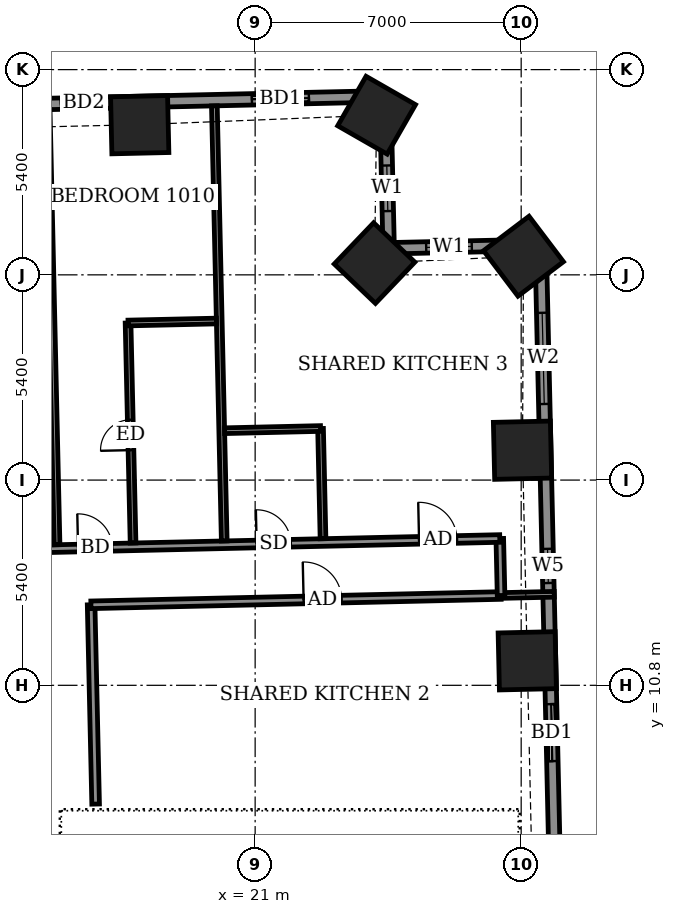
"""IFC4 building model, lengths in metres.
Left out: names, types, materials, properties, quantities, classifications, styles, units other than length and angle.
Written with IfcOpenShell. Run it as: python <this file> out.ifc"""

import sys

from ifc_helpers import new_model, si_unit, direction, frame, frame_2d, origin, origin_2d, place, context, subcontext, project, spatial, rectangle, extrude, element, fill, save


model = new_model("IFC4")
c1 = context("Model", 3, precision=1e-05, world=origin(), true_north=direction((0.0, 1.0)))
c2 = subcontext(c1, "Body", "Model", "MODEL_VIEW")
j1 = project(units=[si_unit("LENGTHUNIT", "METRE"), si_unit("PLANEANGLEUNIT", "RADIAN")], contexts=[c1])
p1 = place(None, origin())
s1 = spatial("IfcSite", under=j1, at=p1, CompositionType="ELEMENT")
p2 = place(p1, origin())
s2 = spatial("IfcBuilding", under=s1, at=p2, CompositionType="ELEMENT")
p3 = place(p2, frame((0.0, 0.0, 44.9)))
s3 = spatial("IfcBuildingStorey", under=s2, at=p3, CompositionType="ELEMENT", Elevation=44.9)
for number, where, z_axis, x_axis in (
    (1, (28.16, 11.445, -0.55), (0.0, 0.0, 1.0), (-0.023, 1.0, 0.0)),
    (2, (28.035, 16.986, -0.55), (0.0, 0.0, 1.0), (-0.023, 1.0, 0.0)),
    (3, (28.061, 22.09, -0.55), (0.0, 0.0, 1.0), (-0.604, 0.797, 0.0)),
    (4, (24.142, 21.91, -0.55), (0.0, 0.0, 1.0), (-0.723, 0.691, 0.0)),
    (5, (24.196, 25.8, -0.55), (0.0, 0.0, 1.0), (-0.868, 0.497, 0.0)),
    (6, (17.963, 25.551, -0.55), (0.0, 0.0, 1.0), (-1.0, -0.023, 0.0)),
):
    element("IfcColumn", number, at=place(p3, frame(where, z_axis=z_axis, x_axis=x_axis)), inside=s3, PredefinedType="COLUMN", context=c2, shape_type="SweptSolid", body=[
        extrude(rectangle(XDim=1.5, YDim=1.5, at=origin_2d()), origin(), (0.0, 0.0, 1.0), 3.6),
    ])
p4 = place(p3, frame((28.887, 5.864, 0.0), z_axis=(0.0, 0.0, 1.0), x_axis=(-0.022687182773, 0.999742612745, 0.0)))
e7 = element("IfcWall", 7, at=p4, inside=s3, PredefinedType="SOLIDWALL", context=c2, shape_type="SweptSolid", body=[
    extrude(rectangle(XDim=16.529, YDim=0.3, at=frame_2d((8.265, 0.0))), origin(), (0.0, 0.0, 1.0), 3.05),
])
p5 = place(p4, frame((2.942, 0.0, 0.0)))
e8 = element("IfcOpeningElement", 8, at=p5, cuts=e7, PredefinedType="OPENING", context=c2, shape_type="SweptSolid", body=[
    extrude(rectangle(XDim=1.5, YDim=2.4, at=frame_2d((0.75, 1.2))), frame((0.0, 0.16, 0.0), z_axis=(0.0, -1.0, 0.0), x_axis=(1.0, 0.0, 0.0)), (0.0, 0.0, 1.0), 0.32),
])
p6 = place(p4, frame((7.629, 0.0, 0.9)))
e9 = element("IfcOpeningElement", 9, at=p6, cuts=e7, PredefinedType="OPENING", context=c2, shape_type="SweptSolid", body=[
    extrude(rectangle(XDim=0.9, YDim=1.5, at=frame_2d((0.45, 0.75))), frame((0.0, 0.16, 0.0), z_axis=(0.0, -1.0, 0.0), x_axis=(1.0, 0.0, 0.0)), (0.0, 0.0, 1.0), 0.32),
])
p7 = place(p4, frame((12.341, 0.0, 0.9)))
e10 = element("IfcOpeningElement", 10, at=p7, cuts=e7, PredefinedType="OPENING", context=c2, shape_type="SweptSolid", body=[
    extrude(rectangle(XDim=2.4, YDim=1.5, at=frame_2d((1.2, 0.75))), frame((0.0, 0.16, 0.0), z_axis=(0.0, -1.0, 0.0), x_axis=(1.0, 0.0, 0.0)), (0.0, 0.0, 1.0), 0.32),
])
p8 = place(p3, frame((28.512, 22.389, 0.0), z_axis=(0.0, 0.0, 1.0), x_axis=(-0.999747725427, -0.022460754759, 0.0)))
e11 = element("IfcWall", 11, at=p8, inside=s3, PredefinedType="SOLIDWALL", context=c2, shape_type="SweptSolid", body=[
    extrude(rectangle(XDim=4.0, YDim=0.3, at=frame_2d((2.0, 0.0))), origin(), (0.0, 0.0, 1.0), 2.55),
])
p9 = place(p8, frame((1.812, 0.0, 0.9)))
e12 = element("IfcOpeningElement", 12, at=p9, cuts=e11, PredefinedType="OPENING", context=c2, shape_type="SweptSolid", body=[
    extrude(rectangle(XDim=1.2, YDim=1.5, at=frame_2d((0.6, 0.75))), frame((0.0, 0.16, 0.0), z_axis=(0.0, -1.0, 0.0), x_axis=(1.0, 0.0, 0.0)), (0.0, 0.0, 1.0), 0.32),
])
p10 = place(p3, frame((24.513, 22.299, 0.0), z_axis=(0.0, 0.0, 1.0), x_axis=(-0.022460754759, 0.999747725427, 0.0)))
e13 = element("IfcWall", 13, at=p10, inside=s3, PredefinedType="SOLIDWALL", context=c2, shape_type="SweptSolid", body=[
    extrude(rectangle(XDim=4.0, YDim=0.3, at=frame_2d((2.0, 0.0))), origin(), (0.0, 0.0, 1.0), 2.55),
])
p11 = place(p10, frame((0.979, 0.0, 0.9)))
e14 = element("IfcOpeningElement", 14, at=p11, cuts=e13, PredefinedType="OPENING", context=c2, shape_type="SweptSolid", body=[
    extrude(rectangle(XDim=1.2, YDim=1.5, at=frame_2d((0.6, 0.75))), frame((0.0, 0.16, 0.0), z_axis=(0.0, -1.0, 0.0), x_axis=(1.0, 0.0, 0.0)), (0.0, 0.0, 1.0), 0.32),
])
p12 = place(p3, frame((24.423, 26.298, 0.0), z_axis=(0.0, 0.0, 1.0), x_axis=(-0.999742433108, -0.022695097355, 0.0)))
e15 = element("IfcWall", 15, at=p12, inside=s3, PredefinedType="SOLIDWALL", context=c2, shape_type="SweptSolid", body=[
    extrude(rectangle(XDim=52.701, YDim=0.3, at=frame_2d((26.35, 0.0))), origin(), (0.0, 0.0, 1.0), 3.05),
])
p13 = place(p12, frame((2.009, 0.0, 0.0)))
e16 = element("IfcOpeningElement", 16, at=p13, cuts=e15, PredefinedType="OPENING", context=c2, shape_type="SweptSolid", body=[
    extrude(rectangle(XDim=1.5, YDim=2.4, at=frame_2d((0.75, 1.2))), frame((0.0, 0.16, 0.0), z_axis=(0.0, -1.0, 0.0), x_axis=(1.0, 0.0, 0.0)), (0.0, 0.0, 1.0), 0.32),
])
p14 = place(p12, frame((7.337, 0.0, 0.0)))
e17 = element("IfcOpeningElement", 17, at=p14, cuts=e15, PredefinedType="OPENING", context=c2, shape_type="SweptSolid", body=[
    extrude(rectangle(XDim=1.2, YDim=2.4, at=frame_2d((0.6, 1.2))), frame((0.0, 0.16, 0.0), z_axis=(0.0, -1.0, 0.0), x_axis=(1.0, 0.0, 0.0)), (0.0, 0.0, 1.0), 0.32),
])
p15 = place(p12, frame((10.0, 0.0, 0.0)))
e18 = element("IfcOpeningElement", 18, at=p15, cuts=e15, PredefinedType="OPENING", context=c2, shape_type="SweptSolid", body=[
    extrude(rectangle(XDim=1.5, YDim=2.4, at=frame_2d((0.75, 1.2))), frame((0.0, 0.16, 0.0), z_axis=(0.0, -1.0, 0.0), x_axis=(1.0, 0.0, 0.0)), (0.0, 0.0, 1.0), 0.32),
])
p16 = place(p12, frame((14.85, 0.0, 0.0)))
e19 = element("IfcOpeningElement", 19, at=p16, cuts=e15, PredefinedType="OPENING", context=c2, shape_type="SweptSolid", body=[
    extrude(rectangle(XDim=1.5, YDim=2.4, at=frame_2d((0.75, 1.2))), frame((0.0, 0.16, 0.0), z_axis=(0.0, -1.0, 0.0), x_axis=(1.0, 0.0, 0.0)), (0.0, 0.0, 1.0), 0.32),
])
p17 = place(p12, frame((20.638, 0.0, 0.9)))
e20 = element("IfcOpeningElement", 20, at=p17, cuts=e15, PredefinedType="OPENING", context=c2, shape_type="SweptSolid", body=[
    extrude(rectangle(XDim=0.9, YDim=1.5, at=frame_2d((0.45, 0.75))), frame((0.0, 0.16, 0.0), z_axis=(0.0, -1.0, 0.0), x_axis=(1.0, 0.0, 0.0)), (0.0, 0.0, 1.0), 0.32),
])
p18 = place(p12, frame((23.125, 0.0, 0.0)))
e21 = element("IfcOpeningElement", 21, at=p18, cuts=e15, PredefinedType="OPENING", context=c2, shape_type="SweptSolid", body=[
    extrude(rectangle(XDim=1.5, YDim=2.4, at=frame_2d((0.75, 1.2))), frame((0.0, 0.16, 0.0), z_axis=(0.0, -1.0, 0.0), x_axis=(1.0, 0.0, 0.0)), (0.0, 0.0, 1.0), 0.32),
])
p19 = place(p12, frame((27.9, 0.0, 0.0)))
e22 = element("IfcOpeningElement", 22, at=p19, cuts=e15, PredefinedType="OPENING", context=c2, shape_type="SweptSolid", body=[
    extrude(rectangle(XDim=1.5, YDim=2.4, at=frame_2d((0.75, 1.2))), frame((0.0, 0.16, 0.0), z_axis=(0.0, -1.0, 0.0), x_axis=(1.0, 0.0, 0.0)), (0.0, 0.0, 1.0), 0.32),
])
p20 = place(p12, frame((30.862, 0.0, 0.0)))
e23 = element("IfcOpeningElement", 23, at=p20, cuts=e15, PredefinedType="OPENING", context=c2, shape_type="SweptSolid", body=[
    extrude(rectangle(XDim=1.2, YDim=2.4, at=frame_2d((0.6, 1.2))), frame((0.0, 0.16, 0.0), z_axis=(0.0, -1.0, 0.0), x_axis=(1.0, 0.0, 0.0)), (0.0, 0.0, 1.0), 0.32),
])
p21 = place(p12, frame((36.1, 0.0, 0.0)))
e24 = element("IfcOpeningElement", 24, at=p21, cuts=e15, PredefinedType="OPENING", context=c2, shape_type="SweptSolid", body=[
    extrude(rectangle(XDim=1.5, YDim=2.4, at=frame_2d((0.75, 1.2))), frame((0.0, 0.16, 0.0), z_axis=(0.0, -1.0, 0.0), x_axis=(1.0, 0.0, 0.0)), (0.0, 0.0, 1.0), 0.32),
])
p22 = place(p12, frame((40.975, 0.0, 0.0)))
e25 = element("IfcOpeningElement", 25, at=p22, cuts=e15, PredefinedType="OPENING", context=c2, shape_type="SweptSolid", body=[
    extrude(rectangle(XDim=1.5, YDim=2.4, at=frame_2d((0.75, 1.2))), frame((0.0, 0.16, 0.0), z_axis=(0.0, -1.0, 0.0), x_axis=(1.0, 0.0, 0.0)), (0.0, 0.0, 1.0), 0.32),
])
p23 = place(p12, frame((43.788, 0.0, 0.0)))
e26 = element("IfcOpeningElement", 26, at=p23, cuts=e15, PredefinedType="OPENING", context=c2, shape_type="SweptSolid", body=[
    extrude(rectangle(XDim=1.5, YDim=2.4, at=frame_2d((0.75, 1.2))), frame((0.0, 0.16, 0.0), z_axis=(0.0, -1.0, 0.0), x_axis=(1.0, 0.0, 0.0)), (0.0, 0.0, 1.0), 0.32),
])
p24 = place(p12, frame((48.464, 0.0, 0.9)))
e27 = element("IfcOpeningElement", 27, at=p24, cuts=e15, PredefinedType="OPENING", context=c2, shape_type="SweptSolid", body=[
    extrude(rectangle(XDim=2.4, YDim=1.5, at=frame_2d((1.2, 0.75))), frame((0.0, 0.16, 0.0), z_axis=(0.0, -1.0, 0.0), x_axis=(1.0, 0.0, 0.0)), (0.0, 0.0, 1.0), 0.32),
])
p25 = place(p3, frame((30.037, 19.073, 0.0), z_axis=(0.0, 0.0, 1.0), x_axis=(-0.022600979566, 0.999744565238, 0.0)))
e28 = element("IfcWall", 28, at=p25, inside=s3, PredefinedType="USERDEFINED", context=c2, shape_type="SweptSolid", body=[
    extrude(rectangle(XDim=3.5, YDim=0.55, at=frame_2d((1.75, 0.0))), origin(), (0.0, 0.0, 1.0), 0.8),
])
p26 = place(p3, frame((16.803, 7.675, 0.0), z_axis=(0.0, 0.0, 1.0), x_axis=(-0.022667483124, 0.999743059595, 0.0)))
e29 = element("IfcWall", 29, at=p26, inside=s3, PredefinedType="PARTITIONING", context=c2, shape_type="SweptSolid", body=[
    extrude(rectangle(XDim=5.245, YDim=0.2, at=frame_2d((2.623, 0.0))), origin(), (0.0, 0.0, 1.0), 3.05),
])
p27 = place(p3, frame((16.679, 12.918, 0.0), z_axis=(0.0, 0.0, 1.0), x_axis=(0.999742162372, 0.022707020428, 0.0)))
e30 = element("IfcWall", 30, at=p27, inside=s3, PredefinedType="PARTITIONING", context=c2, shape_type="SweptSolid", body=[
    extrude(rectangle(XDim=10.795, YDim=0.2, at=frame_2d((5.397, 0.0))), origin(), (0.0, 0.0, 1.0), 3.05),
])
p28 = place(p27, frame((5.598, 0.0, 0.0)))
e31 = element("IfcOpeningElement", 31, at=p28, cuts=e30, PredefinedType="OPENING", context=c2, shape_type="SweptSolid", body=[
    extrude(rectangle(XDim=1.0, YDim=2.1, at=frame_2d((0.5, 1.05))), frame((0.0, 0.11, 0.0), z_axis=(0.0, -1.0, 0.0), x_axis=(1.0, 0.0, 0.0)), (0.0, 0.0, 1.0), 0.22),
])
p29 = place(p3, frame((27.471, 13.163, 0.0), z_axis=(0.0, 0.0, 1.0), x_axis=(0.999739219063, 0.022836240226, 0.0)))
e32 = element("IfcWall", 32, at=p29, inside=s3, PredefinedType="PARTITIONING", context=c2, shape_type="SweptSolid", body=[
    extrude(rectangle(XDim=1.4, YDim=0.15, at=frame_2d((0.7, 0.0))), origin(), (0.0, 0.0, 1.0), 2.55),
])
p30 = place(p3, frame((27.471, 13.163, 0.0), z_axis=(0.0, 0.0, 1.0), x_axis=(-0.022617910375, 0.999744182344, 0.0)))
e33 = element("IfcWall", 33, at=p30, inside=s3, PredefinedType="PARTITIONING", context=c2, shape_type="SweptSolid", body=[
    extrude(rectangle(XDim=1.5, YDim=0.2, at=frame_2d((0.75, 0.0))), origin(), (0.0, 0.0, 1.0), 3.05),
])
p31 = place(p3, frame((-31.347, 13.329, 0.0), z_axis=(0.0, 0.0, 1.0), x_axis=(0.999742613079, 0.022687168058, 0.0)))
e34 = element("IfcWall", 34, at=p31, inside=s3, PredefinedType="PARTITIONING", context=c2, shape_type="SweptSolid", body=[
    extrude(rectangle(XDim=58.799, YDim=0.2, at=frame_2d((29.399, 0.0))), origin(), (0.0, 0.0, 1.0), 3.05),
])
p32 = place(p31, frame((56.675, 0.0, 0.0)))
e35 = element("IfcOpeningElement", 35, at=p32, cuts=e34, PredefinedType="OPENING", context=c2, shape_type="SweptSolid", body=[
    extrude(rectangle(XDim=1.0, YDim=2.1, at=frame_2d((0.5, 1.05))), frame((0.0, 0.11, 0.0), z_axis=(0.0, -1.0, 0.0), x_axis=(1.0, 0.0, 0.0)), (0.0, 0.0, 1.0), 0.22),
])
p33 = place(p31, frame((52.4, 0.0, 0.0)))
e36 = element("IfcOpeningElement", 36, at=p33, cuts=e34, PredefinedType="OPENING", context=c2, shape_type="SweptSolid", body=[
    extrude(rectangle(XDim=0.9, YDim=2.1, at=frame_2d((0.45, 1.05))), frame((0.0, 0.11, 0.0), z_axis=(0.0, -1.0, 0.0), x_axis=(1.0, 0.0, 0.0)), (0.0, 0.0, 1.0), 0.22),
])
p34 = place(p31, frame((47.7, 0.0, 0.0)))
e37 = element("IfcOpeningElement", 37, at=p34, cuts=e34, PredefinedType="OPENING", context=c2, shape_type="SweptSolid", body=[
    extrude(rectangle(XDim=0.9, YDim=2.1, at=frame_2d((0.45, 1.05))), frame((0.0, 0.11, 0.0), z_axis=(0.0, -1.0, 0.0), x_axis=(1.0, 0.0, 0.0)), (0.0, 0.0, 1.0), 0.22),
])
p35 = place(p31, frame((45.7, 0.0, 0.0)))
e38 = element("IfcOpeningElement", 38, at=p35, cuts=e34, PredefinedType="OPENING", context=c2, shape_type="SweptSolid", body=[
    extrude(rectangle(XDim=0.9, YDim=2.1, at=frame_2d((0.45, 1.05))), frame((0.0, 0.11, 0.0), z_axis=(0.0, -1.0, 0.0), x_axis=(1.0, 0.0, 0.0)), (0.0, 0.0, 1.0), 0.22),
])
p36 = place(p31, frame((38.95, 0.0, 0.0)))
e39 = element("IfcOpeningElement", 39, at=p36, cuts=e34, PredefinedType="OPENING", context=c2, shape_type="SweptSolid", body=[
    extrude(rectangle(XDim=0.9, YDim=2.1, at=frame_2d((0.45, 1.05))), frame((0.0, 0.11, 0.0), z_axis=(0.0, -1.0, 0.0), x_axis=(1.0, 0.0, 0.0)), (0.0, 0.0, 1.0), 0.22),
])
p37 = place(p31, frame((37.05, 0.0, 0.0)))
e40 = element("IfcOpeningElement", 40, at=p37, cuts=e34, PredefinedType="OPENING", context=c2, shape_type="SweptSolid", body=[
    extrude(rectangle(XDim=0.9, YDim=2.1, at=frame_2d((0.45, 1.05))), frame((0.0, 0.11, 0.0), z_axis=(0.0, -1.0, 0.0), x_axis=(1.0, 0.0, 0.0)), (0.0, 0.0, 1.0), 0.22),
])
p38 = place(p31, frame((30.375, 0.0, 0.0)))
e41 = element("IfcOpeningElement", 41, at=p38, cuts=e34, PredefinedType="OPENING", context=c2, shape_type="SweptSolid", body=[
    extrude(rectangle(XDim=0.9, YDim=2.1, at=frame_2d((0.45, 1.05))), frame((0.0, 0.11, 0.0), z_axis=(0.0, -1.0, 0.0), x_axis=(1.0, 0.0, 0.0)), (0.0, 0.0, 1.0), 0.22),
])
p39 = place(p31, frame((28.5, 0.0, 0.0)))
e42 = element("IfcOpeningElement", 42, at=p39, cuts=e34, PredefinedType="OPENING", context=c2, shape_type="SweptSolid", body=[
    extrude(rectangle(XDim=0.9, YDim=2.1, at=frame_2d((0.45, 1.05))), frame((0.0, 0.11, 0.0), z_axis=(0.0, -1.0, 0.0), x_axis=(1.0, 0.0, 0.0)), (0.0, 0.0, 1.0), 0.22),
])
p40 = place(p31, frame((21.825, 0.0, 0.0)))
e43 = element("IfcOpeningElement", 43, at=p40, cuts=e34, PredefinedType="OPENING", context=c2, shape_type="SweptSolid", body=[
    extrude(rectangle(XDim=0.9, YDim=2.1, at=frame_2d((0.45, 1.05))), frame((0.0, 0.11, 0.0), z_axis=(0.0, -1.0, 0.0), x_axis=(1.0, 0.0, 0.0)), (0.0, 0.0, 1.0), 0.22),
])
p41 = place(p31, frame((19.95, 0.0, 0.0)))
e44 = element("IfcOpeningElement", 44, at=p41, cuts=e34, PredefinedType="OPENING", context=c2, shape_type="SweptSolid", body=[
    extrude(rectangle(XDim=0.9, YDim=2.1, at=frame_2d((0.45, 1.05))), frame((0.0, 0.11, 0.0), z_axis=(0.0, -1.0, 0.0), x_axis=(1.0, 0.0, 0.0)), (0.0, 0.0, 1.0), 0.22),
])
p42 = place(p31, frame((13.225, 0.0, 0.0)))
e45 = element("IfcOpeningElement", 45, at=p42, cuts=e34, PredefinedType="OPENING", context=c2, shape_type="SweptSolid", body=[
    extrude(rectangle(XDim=0.9, YDim=2.1, at=frame_2d((0.45, 1.05))), frame((0.0, 0.11, 0.0), z_axis=(0.0, -1.0, 0.0), x_axis=(1.0, 0.0, 0.0)), (0.0, 0.0, 1.0), 0.22),
])
p43 = place(p31, frame((11.25, 0.0, 0.0)))
e46 = element("IfcOpeningElement", 46, at=p43, cuts=e34, PredefinedType="OPENING", context=c2, shape_type="SweptSolid", body=[
    extrude(rectangle(XDim=0.9, YDim=2.1, at=frame_2d((0.45, 1.05))), frame((0.0, 0.11, 0.0), z_axis=(0.0, -1.0, 0.0), x_axis=(1.0, 0.0, 0.0)), (0.0, 0.0, 1.0), 0.22),
])
p44 = place(p31, frame((1.75, 0.0, 0.0)))
e47 = element("IfcOpeningElement", 47, at=p44, cuts=e34, PredefinedType="OPENING", context=c2, shape_type="SweptSolid", body=[
    extrude(rectangle(XDim=1.0, YDim=2.1, at=frame_2d((0.5, 1.05))), frame((0.0, 0.11, 0.0), z_axis=(0.0, -1.0, 0.0), x_axis=(1.0, 0.0, 0.0)), (0.0, 0.0, 1.0), 0.22),
])
p45 = place(p31, frame((6.65, 0.0, 0.0)))
e48 = element("IfcOpeningElement", 48, at=p45, cuts=e34, PredefinedType="OPENING", context=c2, shape_type="SweptSolid", body=[
    extrude(rectangle(XDim=0.9, YDim=2.1, at=frame_2d((0.45, 1.05))), frame((0.0, 0.11, 0.0), z_axis=(0.0, -1.0, 0.0), x_axis=(1.0, 0.0, 0.0)), (0.0, 0.0, 1.0), 0.22),
])
p46 = place(p3, frame((15.788, 14.499, 0.0), z_axis=(0.0, 0.0, 1.0), x_axis=(-0.022708327922, 0.999742132674, 0.0)))
e49 = element("IfcWall", 49, at=p46, inside=s3, PredefinedType="PARTITIONING", context=c2, shape_type="SweptSolid", body=[
    extrude(rectangle(XDim=11.45, YDim=0.15, at=frame_2d((5.725, 0.0))), origin(), (0.0, 0.0, 1.0), 2.55),
])
p47 = place(p3, frame((17.788, 14.544, 0.0), z_axis=(0.0, 0.0, 1.0), x_axis=(-0.022809516176, 0.999739829141, 0.0)))
e50 = element("IfcWall", 50, at=p47, inside=s3, PredefinedType="PARTITIONING", context=c2, shape_type="SweptSolid", body=[
    extrude(rectangle(XDim=5.791, YDim=0.15, at=frame_2d((2.895, 0.0))), origin(), (0.0, 0.0, 1.0), 3.05),
])
p48 = place(p47, frame((2.445, 0.0, 0.0)))
e51 = element("IfcOpeningElement", 51, at=p48, cuts=e50, PredefinedType="OPENING", context=c2, shape_type="SweptSolid", body=[
    extrude(rectangle(XDim=0.8, YDim=2.1, at=frame_2d((0.4, 1.05))), frame((0.0, 0.085, 0.0), z_axis=(0.0, -1.0, 0.0), x_axis=(1.0, 0.0, 0.0)), (0.0, 0.0, 1.0), 0.17),
])
p49 = place(p3, frame((20.187, 14.598, 0.0), z_axis=(0.0, 0.0, 1.0), x_axis=(-0.022706391805, 0.999742176649, 0.0)))
e52 = element("IfcWall", 52, at=p49, inside=s3, PredefinedType="PARTITIONING", context=c2, shape_type="SweptSolid", body=[
    extrude(rectangle(XDim=11.451, YDim=0.15, at=frame_2d((5.726, 0.0))), origin(), (0.0, 0.0, 1.0), 2.55),
])
p50 = place(p3, frame((22.786, 14.657, 0.0), z_axis=(0.0, 0.0, 1.0), x_axis=(-0.022388729138, 0.999749340989, 0.0)))
e53 = element("IfcWall", 53, at=p50, inside=s3, PredefinedType="PARTITIONING", context=c2, shape_type="SweptSolid", body=[
    extrude(rectangle(XDim=2.901, YDim=0.15, at=frame_2d((1.45, 0.0))), origin(), (0.0, 0.0, 1.0), 3.05),
])
p51 = place(p3, frame((20.196, 17.499, 0.0), z_axis=(0.0, 0.0, 1.0), x_axis=(0.999737525802, 0.022910248851, 0.0)))
e54 = element("IfcWall", 54, at=p51, inside=s3, PredefinedType="PARTITIONING", context=c2, shape_type="SweptSolid", body=[
    extrude(rectangle(XDim=2.526, YDim=0.15, at=frame_2d((1.263, 0.0))), origin(), (0.0, 0.0, 1.0), 3.05),
])
p52 = place(p3, frame((17.656, 20.333, 0.0), z_axis=(0.0, 0.0, 1.0), x_axis=(0.999749954681, 0.022361308448, 0.0)))
e55 = element("IfcWall", 55, at=p52, inside=s3, PredefinedType="PARTITIONING", context=c2, shape_type="SweptSolid", body=[
    extrude(rectangle(XDim=2.325, YDim=0.15, at=frame_2d((1.163, 0.0))), origin(), (0.0, 0.0, 1.0), 3.05),
])
p53 = place(p5, origin())
e56 = element("IfcDoor", 56, at=p53, inside=s3, OperationType="SLIDING_TO_LEFT", PredefinedType="DOOR", context=c2, shape_type="SweptSolid", body=[
    extrude(rectangle(XDim=1.5, YDim=2.4, at=frame_2d((0.75, 1.2))), frame((0.0, 0.025, 0.0), z_axis=(0.0, -1.0, 0.0), x_axis=(1.0, 0.0, 0.0)), (0.0, 0.0, 1.0), 0.05),
])
fill(e8, e56)
p54 = place(p6, origin())
e57 = element("IfcWindow", 57, at=p54, inside=s3, PartitioningType="SINGLE_PANEL", PredefinedType="WINDOW", context=c2, shape_type="SweptSolid", body=[
    extrude(rectangle(XDim=0.9, YDim=1.5, at=frame_2d((0.45, 0.75))), frame((0.0, 0.03, 0.0), z_axis=(0.0, -1.0, 0.0), x_axis=(1.0, 0.0, 0.0)), (0.0, 0.0, 1.0), 0.06),
])
fill(e9, e57)
p55 = place(p7, origin())
e58 = element("IfcWindow", 58, at=p55, inside=s3, PartitioningType="DOUBLE_PANEL_VERTICAL", PredefinedType="WINDOW", context=c2, shape_type="SweptSolid", body=[
    extrude(rectangle(XDim=2.4, YDim=1.5, at=frame_2d((1.2, 0.75))), frame((0.0, 0.03, 0.0), z_axis=(0.0, -1.0, 0.0), x_axis=(1.0, 0.0, 0.0)), (0.0, 0.0, 1.0), 0.06),
])
fill(e10, e58)
p56 = place(p9, origin())
e59 = element("IfcWindow", 59, at=p56, inside=s3, PartitioningType="SINGLE_PANEL", PredefinedType="WINDOW", context=c2, shape_type="SweptSolid", body=[
    extrude(rectangle(XDim=1.2, YDim=1.5, at=frame_2d((0.6, 0.75))), frame((0.0, 0.03, 0.0), z_axis=(0.0, -1.0, 0.0), x_axis=(1.0, 0.0, 0.0)), (0.0, 0.0, 1.0), 0.06),
])
fill(e12, e59)
p57 = place(p11, origin())
e60 = element("IfcWindow", 60, at=p57, inside=s3, PartitioningType="SINGLE_PANEL", PredefinedType="WINDOW", context=c2, shape_type="SweptSolid", body=[
    extrude(rectangle(XDim=1.2, YDim=1.5, at=frame_2d((0.6, 0.75))), frame((0.0, 0.03, 0.0), z_axis=(0.0, -1.0, 0.0), x_axis=(1.0, 0.0, 0.0)), (0.0, 0.0, 1.0), 0.06),
])
fill(e14, e60)
p58 = place(p13, origin())
e61 = element("IfcDoor", 61, at=p58, inside=s3, OperationType="SLIDING_TO_LEFT", PredefinedType="DOOR", context=c2, shape_type="SweptSolid", body=[
    extrude(rectangle(XDim=1.5, YDim=2.4, at=frame_2d((0.75, 1.2))), frame((0.0, 0.025, 0.0), z_axis=(0.0, -1.0, 0.0), x_axis=(1.0, 0.0, 0.0)), (0.0, 0.0, 1.0), 0.05),
])
fill(e16, e61)
p59 = place(p14, origin())
e62 = element("IfcDoor", 62, at=p59, inside=s3, OperationType="SLIDING_TO_LEFT", PredefinedType="DOOR", context=c2, shape_type="SweptSolid", body=[
    extrude(rectangle(XDim=1.2, YDim=2.4, at=frame_2d((0.6, 1.2))), frame((0.0, 0.025, 0.0), z_axis=(0.0, -1.0, 0.0), x_axis=(1.0, 0.0, 0.0)), (0.0, 0.0, 1.0), 0.05),
])
fill(e17, e62)
p60 = place(p28, origin())
e63 = element("IfcDoor", 63, at=p60, inside=s3, OperationType="SINGLE_SWING_LEFT", PredefinedType="DOOR", context=c2, shape_type="SweptSolid", body=[
    extrude(rectangle(XDim=1.0, YDim=2.1, at=frame_2d((0.5, 1.05))), frame((0.0, 0.025, 0.0), z_axis=(0.0, -1.0, 0.0), x_axis=(1.0, 0.0, 0.0)), (0.0, 0.0, 1.0), 0.05),
])
fill(e31, e63)
p61 = place(p32, origin())
e64 = element("IfcDoor", 64, at=p61, inside=s3, OperationType="SINGLE_SWING_RIGHT", PredefinedType="DOOR", context=c2, shape_type="SweptSolid", body=[
    extrude(rectangle(XDim=1.0, YDim=2.1, at=frame_2d((0.5, 1.05))), frame((0.0, 0.025, 0.0), z_axis=(0.0, -1.0, 0.0), x_axis=(1.0, 0.0, 0.0)), (0.0, 0.0, 1.0), 0.05),
])
fill(e35, e64)
p62 = place(p33, origin())
e65 = element("IfcDoor", 65, at=p62, inside=s3, OperationType="SINGLE_SWING_RIGHT", PredefinedType="DOOR", context=c2, shape_type="SweptSolid", body=[
    extrude(rectangle(XDim=0.9, YDim=2.1, at=frame_2d((0.45, 1.05))), frame((0.0, 0.025, 0.0), z_axis=(0.0, -1.0, 0.0), x_axis=(1.0, 0.0, 0.0)), (0.0, 0.0, 1.0), 0.05),
])
fill(e36, e65)
p63 = place(p34, origin())
e66 = element("IfcDoor", 66, at=p63, inside=s3, OperationType="SINGLE_SWING_RIGHT", PredefinedType="DOOR", context=c2, shape_type="SweptSolid", body=[
    extrude(rectangle(XDim=0.9, YDim=2.1, at=frame_2d((0.45, 1.05))), frame((0.0, 0.025, 0.0), z_axis=(0.0, -1.0, 0.0), x_axis=(1.0, 0.0, 0.0)), (0.0, 0.0, 1.0), 0.05),
])
fill(e37, e66)
p64 = place(p48, origin())
e67 = element("IfcDoor", 67, at=p64, inside=s3, OperationType="SINGLE_SWING_RIGHT", PredefinedType="DOOR", context=c2, shape_type="SweptSolid", body=[
    extrude(rectangle(XDim=0.8, YDim=2.1, at=frame_2d((0.4, 1.05))), frame((0.0, 0.025, 0.0), z_axis=(0.0, -1.0, 0.0), x_axis=(1.0, 0.0, 0.0)), (0.0, 0.0, 1.0), 0.05),
])
fill(e51, e67)
save(model, sys.argv[1])
